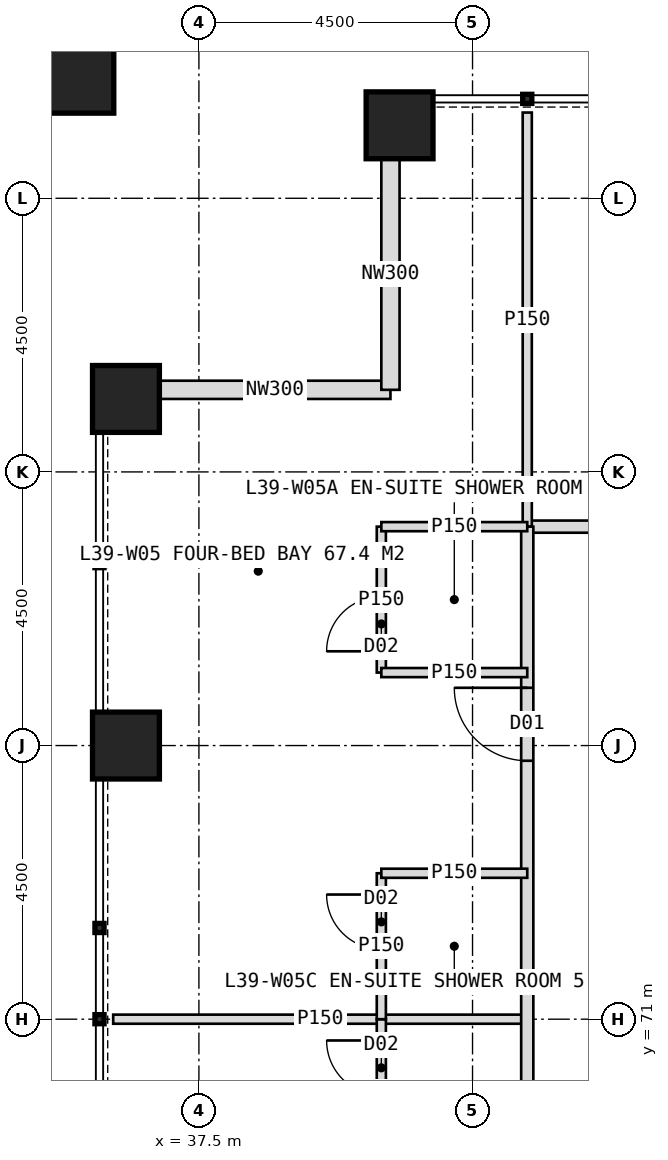
"""IFC4 building model, lengths in metres.
Left out: names, types, materials, properties, quantities, classifications, styles, units other than length and angle.
Written with IfcOpenShell. Run it as: python <this file> out.ifc"""

import sys

from ifc_helpers import new_model, si_unit, direction, frame, frame_2d, origin, origin_2d, place, context, subcontext, project, spatial, rectangle, hollow_rectangle, extrude, element, fill, save


model = new_model("IFC4")
c1 = context("Model", 3, precision=1e-05, world=origin(), true_north=direction((0.0, 1.0)))
c2 = subcontext(c1, "Body", "Model", "MODEL_VIEW")
j1 = project(units=[si_unit("LENGTHUNIT", "METRE"), si_unit("PLANEANGLEUNIT", "RADIAN")], contexts=[c1])
p1 = place(None, origin())
s1 = spatial("IfcSite", under=j1, at=p1, CompositionType="ELEMENT")
p2 = place(p1, origin())
s2 = spatial("IfcBuilding", under=s1, at=p2, CompositionType="ELEMENT")
p3 = place(p2, frame((0.0, 0.0, 164.0)))
s3 = spatial("IfcBuildingStorey", under=s2, at=p3, CompositionType="ELEMENT", Elevation=164.0)
for number, where, z_axis, x_axis in (
    (1, (40.8, 85.7, 0.0), (0.0, 0.0, 1.0), (1.0, 0.0, 0.0)),
    (2, (36.3, 75.5, 0.0), (0.0, 0.0, 1.0), (1.0, 0.0, 0.0)),
    (3, (36.3, 81.2, 0.0), (0.0, 0.0, 1.0), (1.0, 0.0, 0.0)),
):
    element("IfcColumn", number, at=place(p3, frame(where, z_axis=z_axis, x_axis=x_axis)), inside=s3, PredefinedType="COLUMN", context=c2, shape_type="SweptSolid", body=[
        extrude(hollow_rectangle(XDim=1.1, YDim=1.1, WallThickness=0.1, at=origin_2d()), origin(), (0.0, 0.0, 1.0), 4.0),
    ])
p4 = place(p3, frame((35.4, 86.6, 0.0), z_axis=(0.0, 0.0, 1.0), x_axis=(1.0, 0.0, 0.0)))
e4 = element("IfcColumn", 4, at=p4, inside=s3, PredefinedType="COLUMN", context=c2, shape_type="SweptSolid", body=[
    extrude(hollow_rectangle(XDim=1.4, YDim=1.4, WallThickness=0.08, at=origin_2d()), origin(), (0.0, 0.0, 1.0), 4.0),
])
for number, where, z_axis, x_axis in (
    (5, (36.85, 81.35, 0.0), (0.0, 0.0, 1.0), (1.0, 0.0, 0.0)),
    (6, (40.65, 81.35, 0.0), (0.0, 0.0, 1.0), (0.0, 1.0, 0.0)),
):
    element("IfcWall", number, at=place(p3, frame(where, z_axis=z_axis, x_axis=x_axis)), inside=s3, PredefinedType="ELEMENTEDWALL", context=c2, shape_type="SweptSolid", body=[
        extrude(rectangle(XDim=3.8, YDim=0.3, at=frame_2d((1.9, 0.0))), origin(), (0.0, 0.0, 1.0), 4.0),
    ])
p5 = place(p3, frame((42.9, 79.1, 0.0), z_axis=(0.0, 0.0, 1.0), x_axis=(1.0, 0.0, 0.0)))
e7 = element("IfcWall", 7, at=p5, inside=s3, PredefinedType="PARTITIONING", context=c2, shape_type="SweptSolid", body=[
    extrude(rectangle(XDim=34.2, YDim=0.2, at=frame_2d((17.1, 0.0))), origin(), (0.0, 0.0, 1.0), 3.75),
])
p6 = place(p5, frame((3.55, 0.0, 0.0)))
e8 = element("IfcOpeningElement", 8, at=p6, cuts=e7, PredefinedType="OPENING", context=c2, shape_type="SweptSolid", body=[
    extrude(rectangle(XDim=1.0, YDim=2.1, at=frame_2d((0.5, 1.05))), frame((0.0, 0.11, 0.0), z_axis=(0.0, -1.0, 0.0), x_axis=(1.0, 0.0, 0.0)), (0.0, 0.0, 1.0), 0.22),
])
p7 = place(p5, frame((10.75, 0.0, 0.0)))
e9 = element("IfcOpeningElement", 9, at=p7, cuts=e7, PredefinedType="OPENING", context=c2, shape_type="SweptSolid", body=[
    extrude(rectangle(XDim=1.2, YDim=2.2, at=frame_2d((0.6, 1.1))), frame((0.0, 0.11, 0.0), z_axis=(0.0, -1.0, 0.0), x_axis=(1.0, 0.0, 0.0)), (0.0, 0.0, 1.0), 0.22),
])
p8 = place(p5, frame((20.75, 0.0, 0.0)))
e10 = element("IfcOpeningElement", 10, at=p8, cuts=e7, PredefinedType="OPENING", context=c2, shape_type="SweptSolid", body=[
    extrude(rectangle(XDim=1.2, YDim=2.2, at=frame_2d((0.6, 1.1))), frame((0.0, 0.11, 0.0), z_axis=(0.0, -1.0, 0.0), x_axis=(1.0, 0.0, 0.0)), (0.0, 0.0, 1.0), 0.22),
])
p9 = place(p5, frame((27.25, 0.0, 0.0)))
e11 = element("IfcOpeningElement", 11, at=p9, cuts=e7, PredefinedType="OPENING", context=c2, shape_type="SweptSolid", body=[
    extrude(rectangle(XDim=1.2, YDim=2.2, at=frame_2d((0.6, 1.1))), frame((0.0, 0.11, 0.0), z_axis=(0.0, -1.0, 0.0), x_axis=(1.0, 0.0, 0.0)), (0.0, 0.0, 1.0), 0.22),
])
for number, where, z_axis, x_axis in (
    (12, (42.9, 79.1, 0.0), (0.0, 0.0, 1.0), (0.0, 1.0, 0.0)),
    (13, (42.9, 71.0, 0.0), (0.0, 0.0, 1.0), (-1.0, 0.0, 0.0)),
):
    element("IfcWall", number, at=place(p3, frame(where, z_axis=z_axis, x_axis=x_axis)), inside=s3, PredefinedType="PARTITIONING", context=c2, shape_type="SweptSolid", body=[
        extrude(rectangle(XDim=6.81, YDim=0.15, at=frame_2d((3.405, 0.0))), origin(), (0.0, 0.0, 1.0), 3.75),
    ])
p10 = place(p3, frame((42.9, 44.9, 0.0), z_axis=(0.0, 0.0, 1.0), x_axis=(0.0, 1.0, 0.0)))
e14 = element("IfcWall", 14, at=p10, inside=s3, PredefinedType="PARTITIONING", context=c2, shape_type="SweptSolid", body=[
    extrude(rectangle(XDim=34.2, YDim=0.2, at=frame_2d((17.1, 0.0))), origin(), (0.0, 0.0, 1.0), 3.75),
])
p11 = place(p10, frame((2.15, 0.0, 0.0)))
e15 = element("IfcOpeningElement", 15, at=p11, cuts=e14, PredefinedType="OPENING", context=c2, shape_type="SweptSolid", body=[
    extrude(rectangle(XDim=1.2, YDim=2.2, at=frame_2d((0.6, 1.1))), frame((0.0, 0.11, 0.0), z_axis=(0.0, -1.0, 0.0), x_axis=(1.0, 0.0, 0.0)), (0.0, 0.0, 1.0), 0.22),
])
p12 = place(p10, frame((9.25, 0.0, 0.0)))
e16 = element("IfcOpeningElement", 16, at=p12, cuts=e14, PredefinedType="OPENING", context=c2, shape_type="SweptSolid", body=[
    extrude(rectangle(XDim=1.2, YDim=2.2, at=frame_2d((0.6, 1.1))), frame((0.0, 0.11, 0.0), z_axis=(0.0, -1.0, 0.0), x_axis=(1.0, 0.0, 0.0)), (0.0, 0.0, 1.0), 0.22),
])
p13 = place(p10, frame((13.25, 0.0, 0.0)))
e17 = element("IfcOpeningElement", 17, at=p13, cuts=e14, PredefinedType="OPENING", context=c2, shape_type="SweptSolid", body=[
    extrude(rectangle(XDim=1.2, YDim=2.2, at=frame_2d((0.6, 1.1))), frame((0.0, 0.11, 0.0), z_axis=(0.0, -1.0, 0.0), x_axis=(1.0, 0.0, 0.0)), (0.0, 0.0, 1.0), 0.22),
])
p14 = place(p10, frame((19.75, 0.0, 0.0)))
e18 = element("IfcOpeningElement", 18, at=p14, cuts=e14, PredefinedType="OPENING", context=c2, shape_type="SweptSolid", body=[
    extrude(rectangle(XDim=1.2, YDim=2.2, at=frame_2d((0.6, 1.1))), frame((0.0, 0.11, 0.0), z_axis=(0.0, -1.0, 0.0), x_axis=(1.0, 0.0, 0.0)), (0.0, 0.0, 1.0), 0.22),
])
p15 = place(p10, frame((30.35, 0.0, 0.0)))
e19 = element("IfcOpeningElement", 19, at=p15, cuts=e14, PredefinedType="OPENING", context=c2, shape_type="SweptSolid", body=[
    extrude(rectangle(XDim=1.2, YDim=2.2, at=frame_2d((0.6, 1.1))), frame((0.0, 0.11, 0.0), z_axis=(0.0, -1.0, 0.0), x_axis=(1.0, 0.0, 0.0)), (0.0, 0.0, 1.0), 0.22),
])
p16 = place(p3, frame((40.5, 68.6, 0.0), z_axis=(0.0, 0.0, 1.0), x_axis=(0.0, 1.0, 0.0)))
e20 = element("IfcWall", 20, at=p16, inside=s3, PredefinedType="PARTITIONING", context=c2, shape_type="SweptSolid", body=[
    extrude(rectangle(XDim=2.4, YDim=0.15, at=frame_2d((1.2, 0.0))), origin(), (0.0, 0.0, 1.0), 3.75),
])
p17 = place(p16, frame((1.15, 0.0, 0.0)))
e21 = element("IfcOpeningElement", 21, at=p17, cuts=e20, PredefinedType="OPENING", context=c2, shape_type="SweptSolid", body=[
    extrude(rectangle(XDim=0.9, YDim=2.1, at=frame_2d((0.45, 1.05))), frame((0.0, 0.085, 0.0), z_axis=(0.0, -1.0, 0.0), x_axis=(1.0, 0.0, 0.0)), (0.0, 0.0, 1.0), 0.17),
])
p18 = place(p3, frame((40.5, 76.7, 0.0), z_axis=(0.0, 0.0, 1.0), x_axis=(0.0, 1.0, 0.0)))
e22 = element("IfcWall", 22, at=p18, inside=s3, PredefinedType="PARTITIONING", context=c2, shape_type="SweptSolid", body=[
    extrude(rectangle(XDim=2.4, YDim=0.15, at=frame_2d((1.2, 0.0))), origin(), (0.0, 0.0, 1.0), 3.75),
])
p19 = place(p18, frame((0.35, 0.0, 0.0)))
e23 = element("IfcOpeningElement", 23, at=p19, cuts=e22, PredefinedType="OPENING", context=c2, shape_type="SweptSolid", body=[
    extrude(rectangle(XDim=0.9, YDim=2.1, at=frame_2d((0.45, 1.05))), frame((0.0, 0.085, 0.0), z_axis=(0.0, -1.0, 0.0), x_axis=(1.0, 0.0, 0.0)), (0.0, 0.0, 1.0), 0.17),
])
p20 = place(p3, frame((42.9, 76.7, 0.0), z_axis=(0.0, 0.0, 1.0), x_axis=(-1.0, 0.0, 0.0)))
e24 = element("IfcWall", 24, at=p20, inside=s3, PredefinedType="PARTITIONING", context=c2, shape_type="SweptSolid", body=[
    extrude(rectangle(XDim=2.4, YDim=0.15, at=frame_2d((1.2, 0.0))), origin(), (0.0, 0.0, 1.0), 3.75),
])
p21 = place(p3, frame((40.5, 71.0, 0.0), z_axis=(0.0, 0.0, 1.0), x_axis=(0.0, 1.0, 0.0)))
e25 = element("IfcWall", 25, at=p21, inside=s3, PredefinedType="PARTITIONING", context=c2, shape_type="SweptSolid", body=[
    extrude(rectangle(XDim=2.4, YDim=0.15, at=frame_2d((1.2, 0.0))), origin(), (0.0, 0.0, 1.0), 3.75),
])
p22 = place(p21, frame((1.15, 0.0, 0.0)))
e26 = element("IfcOpeningElement", 26, at=p22, cuts=e25, PredefinedType="OPENING", context=c2, shape_type="SweptSolid", body=[
    extrude(rectangle(XDim=0.9, YDim=2.1, at=frame_2d((0.45, 1.05))), frame((0.0, 0.085, 0.0), z_axis=(0.0, -1.0, 0.0), x_axis=(1.0, 0.0, 0.0)), (0.0, 0.0, 1.0), 0.17),
])
for number, where, z_axis, x_axis in (
    (27, (42.9, 73.4, 0.0), (0.0, 0.0, 1.0), (-1.0, 0.0, 0.0)),
    (28, (42.9, 79.1, 0.0), (0.0, 0.0, 1.0), (-1.0, 0.0, 0.0)),
):
    element("IfcWall", number, at=place(p3, frame(where, z_axis=z_axis, x_axis=x_axis)), inside=s3, PredefinedType="PARTITIONING", context=c2, shape_type="SweptSolid", body=[
        extrude(rectangle(XDim=2.4, YDim=0.15, at=frame_2d((1.2, 0.0))), origin(), (0.0, 0.0, 1.0), 3.75),
    ])
p23 = place(p17, origin())
e29 = element("IfcDoor", 29, at=p23, inside=s3, OperationType="SINGLE_SWING_RIGHT", PredefinedType="DOOR", context=c2, shape_type="SweptSolid", body=[
    extrude(rectangle(XDim=0.9, YDim=2.1, at=frame_2d((0.45, 1.05))), frame((0.0, 0.025, 0.0), z_axis=(0.0, -1.0, 0.0), x_axis=(1.0, 0.0, 0.0)), (0.0, 0.0, 1.0), 0.05),
])
fill(e21, e29)
p24 = place(p15, origin())
e30 = element("IfcDoor", 30, at=p24, inside=s3, OperationType="SINGLE_SWING_RIGHT", PredefinedType="DOOR", context=c2, shape_type="SweptSolid", body=[
    extrude(rectangle(XDim=1.2, YDim=2.2, at=frame_2d((0.6, 1.1))), frame((0.0, 0.025, 0.0), z_axis=(0.0, -1.0, 0.0), x_axis=(1.0, 0.0, 0.0)), (0.0, 0.0, 1.0), 0.05),
])
fill(e19, e30)
p25 = place(p19, origin())
e31 = element("IfcDoor", 31, at=p25, inside=s3, OperationType="SINGLE_SWING_LEFT", PredefinedType="DOOR", context=c2, shape_type="SweptSolid", body=[
    extrude(rectangle(XDim=0.9, YDim=2.1, at=frame_2d((0.45, 1.05))), frame((0.0, 0.025, 0.0), z_axis=(0.0, -1.0, 0.0), x_axis=(1.0, 0.0, 0.0)), (0.0, 0.0, 1.0), 0.05),
])
fill(e23, e31)
p26 = place(p22, origin())
e32 = element("IfcDoor", 32, at=p26, inside=s3, OperationType="SINGLE_SWING_RIGHT", PredefinedType="DOOR", context=c2, shape_type="SweptSolid", body=[
    extrude(rectangle(XDim=0.9, YDim=2.1, at=frame_2d((0.45, 1.05))), frame((0.0, 0.025, 0.0), z_axis=(0.0, -1.0, 0.0), x_axis=(1.0, 0.0, 0.0)), (0.0, 0.0, 1.0), 0.05),
])
fill(e26, e32)
save(model, sys.argv[1])
